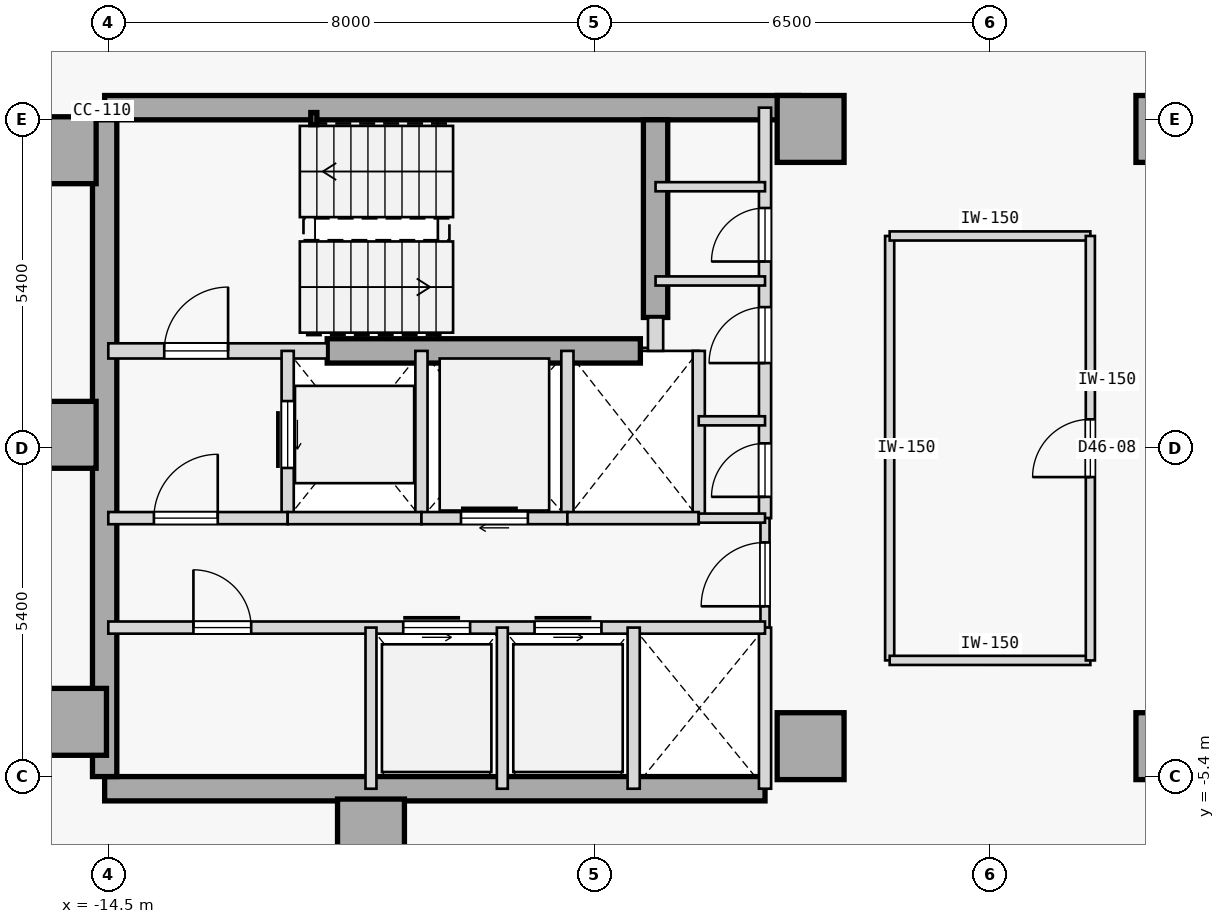
"""IFC4 building model, lengths in metres.
Left out: names, types, materials, properties, quantities, classifications, styles, units other than length and angle.
Written with IfcOpenShell. Run it as: python <this file> out.ifc"""

import sys

from ifc_helpers import new_model, si_unit, direction, frame, frame_2d, origin, origin_2d, place, context, subcontext, project, spatial, rectangle, hollow_rectangle, extrude, element, fill, save


model = new_model("IFC4")
c1 = context("Model", 3, precision=1e-05, world=origin(), true_north=direction((0.0, 1.0)))
c2 = subcontext(c1, "Body", "Model", "MODEL_VIEW")
j1 = project(units=[si_unit("LENGTHUNIT", "METRE"), si_unit("PLANEANGLEUNIT", "RADIAN")], contexts=[c1])
p1 = place(None, origin())
s1 = spatial("IfcSite", under=j1, at=p1, CompositionType="ELEMENT")
p2 = place(p1, origin())
s2 = spatial("IfcBuilding", under=s1, at=p2, CompositionType="ELEMENT")
p3 = place(p2, frame((0.0, 0.0, 178.6)))
s3 = spatial("IfcBuildingStorey", under=s2, at=p3, CompositionType="ELEMENT", Elevation=178.6)
for number, where, z_axis, x_axis in (
    (1, (-15.25, 4.9, 0.0), (0.0, 0.0, 1.0), (1.0, 0.0, 0.0)),
    (2, (-15.25, 0.22, 0.0), (0.0, 0.0, 1.0), (1.0, 0.0, 0.0)),
    (3, (-15.08, -4.5, 0.0), (0.0, 0.0, 1.0), (1.0, 0.0, 0.0)),
    (4, (-10.18, -6.32, 0.0), (0.0, 0.0, 1.0), (1.0, 0.0, 0.0)),
    (5, (-2.95, -4.9, 0.0), (0.0, 0.0, 1.0), (1.0, 0.0, 0.0)),
    (6, (-2.95, 5.25, 0.0), (0.0, 0.0, 1.0), (1.0, 0.0, 0.0)),
    (7, (2.95, -4.9, 0.0), (0.0, 0.0, 1.0), (1.0, 0.0, 0.0)),
    (8, (2.95, 5.25, 0.0), (0.0, 0.0, 1.0), (1.0, 0.0, 0.0)),
):
    element("IfcColumn", number, at=place(p3, frame(where, z_axis=z_axis, x_axis=x_axis)), inside=s3, PredefinedType="COLUMN", context=c2, shape_type="SweptSolid", body=[
        extrude(rectangle(XDim=1.1, YDim=1.1, at=origin_2d()), origin(), (0.0, 0.0, 1.0), 3.4),
    ])
p4 = place(p3, frame((-14.56, 5.6, 0.0), z_axis=(0.0, 0.0, 1.0), x_axis=(1.0, 0.0, 0.0)))
e9 = element("IfcWall", 9, at=p4, inside=s3, PredefinedType="SHEAR", context=c2, shape_type="SweptSolid", body=[
    extrude(rectangle(XDim=11.41, YDim=0.4, at=frame_2d((5.705, 0.0))), origin(), (0.0, 0.0, 1.0), 3.175),
])
p5 = place(p3, frame((-14.56, -5.6, 0.0), z_axis=(0.0, 0.0, 1.0), x_axis=(1.0, 0.0, 0.0)))
e10 = element("IfcWall", 10, at=p5, inside=s3, PredefinedType="SHEAR", context=c2, shape_type="SweptSolid", body=[
    extrude(rectangle(XDim=10.86, YDim=0.4, at=frame_2d((5.43, 0.0))), origin(), (0.0, 0.0, 1.0), 3.175),
])
p6 = place(p3, frame((-14.56, -5.4, 0.0), z_axis=(0.0, 0.0, 1.0), x_axis=(0.0, 1.0, 0.0)))
e11 = element("IfcWall", 11, at=p6, inside=s3, PredefinedType="SHEAR", context=c2, shape_type="SweptSolid", body=[
    extrude(rectangle(XDim=10.8, YDim=0.4, at=frame_2d((5.4, 0.0))), origin(), (0.0, 0.0, 1.0), 3.175),
])
p7 = place(p3, frame((-5.5, 2.15, 0.0), z_axis=(0.0, 0.0, 1.0), x_axis=(0.0, 1.0, 0.0)))
e12 = element("IfcWall", 12, at=p7, inside=s3, PredefinedType="SHEAR", context=c2, shape_type="SweptSolid", body=[
    extrude(rectangle(XDim=3.25, YDim=0.4, at=frame_2d((1.625, 0.0))), origin(), (0.0, 0.0, 1.0), 3.175),
])
p8 = place(p3, frame((-10.9, 1.6, 0.0), z_axis=(0.0, 0.0, 1.0), x_axis=(1.0, 0.0, 0.0)))
e13 = element("IfcWall", 13, at=p8, inside=s3, PredefinedType="SHEAR", context=c2, shape_type="SweptSolid", body=[
    extrude(rectangle(XDim=5.15, YDim=0.4, at=frame_2d((2.575, 0.0))), origin(), (0.0, 0.0, 1.0), 3.175),
])
p9 = place(p3, frame((-11.12, 5.42, 0.0), z_axis=(0.0, 0.0, 1.0), x_axis=(1.0, 0.0, 0.0)))
e14 = element("IfcColumn", 14, at=p9, inside=s3, PredefinedType="COLUMN", context=c2, shape_type="SweptSolid", body=[
    extrude(hollow_rectangle(XDim=0.1, YDim=0.2, WallThickness=0.008, at=origin_2d()), origin(), (0.0, 0.0, 1.0), 3.4),
])
p10 = place(p3, frame((-14.5, 1.6, 0.0), z_axis=(0.0, 0.0, 1.0), x_axis=(1.0, 0.0, 0.0)))
e15 = element("IfcWall", 15, at=p10, inside=s3, PredefinedType="STANDARD", context=c2, shape_type="SweptSolid", body=[
    extrude(rectangle(XDim=3.6, YDim=0.25, at=frame_2d((1.8, 0.0))), origin(), (0.0, 0.0, 1.0), 3.175),
])
p11 = place(p10, frame((0.92, 0.0, 0.0)))
e16 = element("IfcOpeningElement", 16, at=p11, cuts=e15, PredefinedType="OPENING", context=c2, shape_type="SweptSolid", body=[
    extrude(rectangle(XDim=1.05, YDim=2.15, at=frame_2d((0.525, 1.075))), frame((0.0, 0.135, 0.0), z_axis=(0.0, -1.0, 0.0), x_axis=(1.0, 0.0, 0.0)), (0.0, 0.0, 1.0), 0.27),
])
p12 = place(p3, frame((-5.5, 1.6, 0.0), z_axis=(0.0, 0.0, 1.0), x_axis=(0.0, 1.0, 0.0)))
e17 = element("IfcWall", 17, at=p12, inside=s3, PredefinedType="STANDARD", context=c2, shape_type="SweptSolid", body=[
    extrude(rectangle(XDim=0.55, YDim=0.25, at=frame_2d((0.275, 0.0))), origin(), (0.0, 0.0, 1.0), 3.175),
])
p13 = place(p3, frame((-3.7, -1.15, 0.0), z_axis=(0.0, 0.0, 1.0), x_axis=(0.0, 1.0, 0.0)))
e18 = element("IfcWall", 18, at=p13, inside=s3, PredefinedType="STANDARD", context=c2, shape_type="SweptSolid", body=[
    extrude(rectangle(XDim=6.75, YDim=0.2, at=frame_2d((3.375, 0.0))), origin(), (0.0, 0.0, 1.0), 3.175),
])
p14 = place(p13, frame((0.35, 0.0, 0.0)))
e19 = element("IfcOpeningElement", 19, at=p14, cuts=e18, PredefinedType="OPENING", context=c2, shape_type="SweptSolid", body=[
    extrude(rectangle(XDim=0.88, YDim=2.15, at=frame_2d((0.44, 1.075))), frame((0.0, 0.11, 0.0), z_axis=(0.0, -1.0, 0.0), x_axis=(1.0, 0.0, 0.0)), (0.0, 0.0, 1.0), 0.22),
])
p15 = place(p13, frame((2.55, 0.0, 0.0)))
e20 = element("IfcOpeningElement", 20, at=p15, cuts=e18, PredefinedType="OPENING", context=c2, shape_type="SweptSolid", body=[
    extrude(rectangle(XDim=0.92, YDim=2.15, at=frame_2d((0.46, 1.075))), frame((0.0, 0.11, 0.0), z_axis=(0.0, -1.0, 0.0), x_axis=(1.0, 0.0, 0.0)), (0.0, 0.0, 1.0), 0.22),
])
p16 = place(p13, frame((4.22, 0.0, 0.0)))
e21 = element("IfcOpeningElement", 21, at=p16, cuts=e18, PredefinedType="OPENING", context=c2, shape_type="SweptSolid", body=[
    extrude(rectangle(XDim=0.88, YDim=2.15, at=frame_2d((0.44, 1.075))), frame((0.0, 0.11, 0.0), z_axis=(0.0, -1.0, 0.0), x_axis=(1.0, 0.0, 0.0)), (0.0, 0.0, 1.0), 0.22),
])
p17 = place(p3, frame((-3.7, -2.95, 0.0), z_axis=(0.0, 0.0, 1.0), x_axis=(0.0, 1.0, 0.0)))
e22 = element("IfcWall", 22, at=p17, inside=s3, PredefinedType="PARTITIONING", context=c2, shape_type="SweptSolid", body=[
    extrude(rectangle(XDim=1.8, YDim=0.15, at=frame_2d((0.9, 0.0))), origin(), (0.0, 0.0, 1.0), 3.175),
])
p18 = place(p17, frame((0.35, 0.0, 0.0)))
e23 = element("IfcOpeningElement", 23, at=p18, cuts=e22, PredefinedType="OPENING", context=c2, shape_type="SweptSolid", body=[
    extrude(rectangle(XDim=1.05, YDim=2.18, at=frame_2d((0.525, 1.09))), frame((0.0, 0.085, 0.0), z_axis=(0.0, -1.0, 0.0), x_axis=(1.0, 0.0, 0.0)), (0.0, 0.0, 1.0), 0.17),
])
p19 = place(p3, frame((-3.7, -5.6, 0.0), z_axis=(0.0, 0.0, 1.0), x_axis=(0.0, 1.0, 0.0)))
e24 = element("IfcWall", 24, at=p19, inside=s3, PredefinedType="STANDARD", context=c2, shape_type="SweptSolid", body=[
    extrude(rectangle(XDim=2.65, YDim=0.2, at=frame_2d((1.325, 0.0))), origin(), (0.0, 0.0, 1.0), 3.175),
])
p20 = place(p3, frame((-11.55, -1.15, 0.0), z_axis=(0.0, 0.0, 1.0), x_axis=(0.0, 1.0, 0.0)))
e25 = element("IfcWall", 25, at=p20, inside=s3, PredefinedType="STANDARD", context=c2, shape_type="SweptSolid", body=[
    extrude(rectangle(XDim=2.75, YDim=0.2, at=frame_2d((1.375, 0.0))), origin(), (0.0, 0.0, 1.0), 3.175),
])
p21 = place(p20, frame((0.825, 0.0, 0.0)))
e26 = element("IfcOpeningElement", 26, at=p21, cuts=e25, PredefinedType="OPENING", context=c2, shape_type="SweptSolid", body=[
    extrude(rectangle(XDim=1.1, YDim=2.15, at=frame_2d((0.55, 1.075))), frame((0.0, 0.11, 0.0), z_axis=(0.0, -1.0, 0.0), x_axis=(1.0, 0.0, 0.0)), (0.0, 0.0, 1.0), 0.22),
])
p22 = place(p3, frame((-9.35, -1.15, 0.0), z_axis=(0.0, 0.0, 1.0), x_axis=(0.0, 1.0, 0.0)))
e27 = element("IfcWall", 27, at=p22, inside=s3, PredefinedType="STANDARD", context=c2, shape_type="SweptSolid", body=[
    extrude(rectangle(XDim=2.75, YDim=0.2, at=frame_2d((1.375, 0.0))), origin(), (0.0, 0.0, 1.0), 3.175),
])
p23 = place(p3, frame((-14.5, -1.15, 0.0), z_axis=(0.0, 0.0, 1.0), x_axis=(1.0, 0.0, 0.0)))
e28 = element("IfcWall", 28, at=p23, inside=s3, PredefinedType="STANDARD", context=c2, shape_type="SweptSolid", body=[
    extrude(rectangle(XDim=2.95, YDim=0.2, at=frame_2d((1.475, 0.0))), origin(), (0.0, 0.0, 1.0), 3.175),
])
p24 = place(p23, frame((0.75, 0.0, 0.0)))
e29 = element("IfcOpeningElement", 29, at=p24, cuts=e28, PredefinedType="OPENING", context=c2, shape_type="SweptSolid", body=[
    extrude(rectangle(XDim=1.05, YDim=2.18, at=frame_2d((0.525, 1.09))), frame((0.0, 0.11, 0.0), z_axis=(0.0, -1.0, 0.0), x_axis=(1.0, 0.0, 0.0)), (0.0, 0.0, 1.0), 0.22),
])
p25 = place(p3, frame((-11.55, -1.15, 0.0), z_axis=(0.0, 0.0, 1.0), x_axis=(1.0, 0.0, 0.0)))
e30 = element("IfcWall", 30, at=p25, inside=s3, PredefinedType="STANDARD", context=c2, shape_type="SweptSolid", body=[
    extrude(rectangle(XDim=2.2, YDim=0.2, at=frame_2d((1.1, 0.0))), origin(), (0.0, 0.0, 1.0), 3.175),
])
p26 = place(p3, frame((-6.95, -1.15, 0.0), z_axis=(0.0, 0.0, 1.0), x_axis=(0.0, 1.0, 0.0)))
e31 = element("IfcWall", 31, at=p26, inside=s3, PredefinedType="STANDARD", context=c2, shape_type="SweptSolid", body=[
    extrude(rectangle(XDim=2.75, YDim=0.2, at=frame_2d((1.375, 0.0))), origin(), (0.0, 0.0, 1.0), 3.175),
])
p27 = place(p3, frame((-9.35, -1.15, 0.0), z_axis=(0.0, 0.0, 1.0), x_axis=(1.0, 0.0, 0.0)))
e32 = element("IfcWall", 32, at=p27, inside=s3, PredefinedType="STANDARD", context=c2, shape_type="SweptSolid", body=[
    extrude(rectangle(XDim=2.4, YDim=0.2, at=frame_2d((1.2, 0.0))), origin(), (0.0, 0.0, 1.0), 3.175),
])
p28 = place(p27, frame((0.65, 0.0, 0.0)))
e33 = element("IfcOpeningElement", 33, at=p28, cuts=e32, PredefinedType="OPENING", context=c2, shape_type="SweptSolid", body=[
    extrude(rectangle(XDim=1.1, YDim=2.15, at=frame_2d((0.55, 1.075))), frame((0.0, 0.11, 0.0), z_axis=(0.0, -1.0, 0.0), x_axis=(1.0, 0.0, 0.0)), (0.0, 0.0, 1.0), 0.22),
])
p29 = place(p3, frame((-4.79, -1.15, 0.0), z_axis=(0.0, 0.0, 1.0), x_axis=(0.0, 1.0, 0.0)))
e34 = element("IfcWall", 34, at=p29, inside=s3, PredefinedType="STANDARD", context=c2, shape_type="SweptSolid", body=[
    extrude(rectangle(XDim=2.75, YDim=0.2, at=frame_2d((1.375, 0.0))), origin(), (0.0, 0.0, 1.0), 3.175),
])
p30 = place(p3, frame((-6.95, -1.15, 0.0), z_axis=(0.0, 0.0, 1.0), x_axis=(1.0, 0.0, 0.0)))
e35 = element("IfcWall", 35, at=p30, inside=s3, PredefinedType="STANDARD", context=c2, shape_type="SweptSolid", body=[
    extrude(rectangle(XDim=2.16, YDim=0.2, at=frame_2d((1.08, 0.0))), origin(), (0.0, 0.0, 1.0), 3.175),
])
p31 = place(p3, frame((-4.79, -1.15, 0.0), z_axis=(0.0, 0.0, 1.0), x_axis=(1.0, 0.0, 0.0)))
e36 = element("IfcWall", 36, at=p31, inside=s3, PredefinedType="PARTITIONING", context=c2, shape_type="SweptSolid", body=[
    extrude(rectangle(XDim=1.09, YDim=0.15, at=frame_2d((0.545, 0.0))), origin(), (0.0, 0.0, 1.0), 3.175),
])
p32 = place(p3, frame((-14.5, -2.95, 0.0), z_axis=(0.0, 0.0, 1.0), x_axis=(1.0, 0.0, 0.0)))
e37 = element("IfcWall", 37, at=p32, inside=s3, PredefinedType="STANDARD", context=c2, shape_type="SweptSolid", body=[
    extrude(rectangle(XDim=10.8, YDim=0.2, at=frame_2d((5.4, 0.0))), origin(), (0.0, 0.0, 1.0), 3.175),
])
p33 = place(p32, frame((4.85, 0.0, 0.0)))
e38 = element("IfcOpeningElement", 38, at=p33, cuts=e37, PredefinedType="OPENING", context=c2, shape_type="SweptSolid", body=[
    extrude(rectangle(XDim=1.1, YDim=2.15, at=frame_2d((0.55, 1.075))), frame((0.0, 0.11, 0.0), z_axis=(0.0, -1.0, 0.0), x_axis=(1.0, 0.0, 0.0)), (0.0, 0.0, 1.0), 0.22),
])
p34 = place(p32, frame((7.01, 0.0, 0.0)))
e39 = element("IfcOpeningElement", 39, at=p34, cuts=e37, PredefinedType="OPENING", context=c2, shape_type="SweptSolid", body=[
    extrude(rectangle(XDim=1.1, YDim=2.15, at=frame_2d((0.55, 1.075))), frame((0.0, 0.11, 0.0), z_axis=(0.0, -1.0, 0.0), x_axis=(1.0, 0.0, 0.0)), (0.0, 0.0, 1.0), 0.22),
])
p35 = place(p32, frame((1.4, 0.0, 0.0)))
e40 = element("IfcOpeningElement", 40, at=p35, cuts=e37, PredefinedType="OPENING", context=c2, shape_type="SweptSolid", body=[
    extrude(rectangle(XDim=0.95, YDim=2.15, at=frame_2d((0.475, 1.075))), frame((0.0, 0.11, 0.0), z_axis=(0.0, -1.0, 0.0), x_axis=(1.0, 0.0, 0.0)), (0.0, 0.0, 1.0), 0.22),
])
p36 = place(p3, frame((-5.86, -5.6, 0.0), z_axis=(0.0, 0.0, 1.0), x_axis=(0.0, 1.0, 0.0)))
e41 = element("IfcWall", 41, at=p36, inside=s3, PredefinedType="STANDARD", context=c2, shape_type="SweptSolid", body=[
    extrude(rectangle(XDim=2.65, YDim=0.2, at=frame_2d((1.325, 0.0))), origin(), (0.0, 0.0, 1.0), 3.175),
])
for number, where, z_axis, x_axis in (
    (42, (-10.18, -5.6, 0.0), (0.0, 0.0, 1.0), (0.0, 1.0, 0.0)),
    (43, (-8.02, -5.6, 0.0), (0.0, 0.0, 1.0), (0.0, 1.0, 0.0)),
):
    element("IfcWall", number, at=place(p3, frame(where, z_axis=z_axis, x_axis=x_axis)), inside=s3, PredefinedType="STANDARD", context=c2, shape_type="SweptSolid", body=[
        extrude(rectangle(XDim=2.65, YDim=0.18, at=frame_2d((1.325, 0.0))), origin(), (0.0, 0.0, 1.0), 3.175),
    ])
p37 = place(p3, frame((-5.5, 4.3, 0.0), z_axis=(0.0, 0.0, 1.0), x_axis=(1.0, 0.0, 0.0)))
e44 = element("IfcWall", 44, at=p37, inside=s3, PredefinedType="PARTITIONING", context=c2, shape_type="SweptSolid", body=[
    extrude(rectangle(XDim=1.8, YDim=0.15, at=frame_2d((0.9, 0.0))), origin(), (0.0, 0.0, 1.0), 3.175),
])
p38 = place(p3, frame((-4.79, 0.45, 0.0), z_axis=(0.0, 0.0, 1.0), x_axis=(1.0, 0.0, 0.0)))
e45 = element("IfcWall", 45, at=p38, inside=s3, PredefinedType="PARTITIONING", context=c2, shape_type="SweptSolid", body=[
    extrude(rectangle(XDim=1.09, YDim=0.15, at=frame_2d((0.545, 0.0))), origin(), (0.0, 0.0, 1.0), 3.175),
])
p39 = place(p3, frame((-5.5, 2.75, 0.0), z_axis=(0.0, 0.0, 1.0), x_axis=(1.0, 0.0, 0.0)))
e46 = element("IfcWall", 46, at=p39, inside=s3, PredefinedType="PARTITIONING", context=c2, shape_type="SweptSolid", body=[
    extrude(rectangle(XDim=1.8, YDim=0.15, at=frame_2d((0.9, 0.0))), origin(), (0.0, 0.0, 1.0), 3.175),
])
p40 = place(p3, frame((-1.65, -3.49, 0.0), z_axis=(0.0, 0.0, 1.0), x_axis=(-3.4979712e-05, 0.999999999388, 0.0)))
e47 = element("IfcWall", 47, at=p40, inside=s3, PredefinedType="PARTITIONING", context=c2, shape_type="SweptSolid", body=[
    extrude(rectangle(XDim=6.979, YDim=0.15, at=frame_2d((3.49, 0.0))), origin(), (0.0, 0.0, 1.0), 3.175),
])
p41 = place(p3, frame((-1.65, -3.49, 0.0), z_axis=(0.0, 0.0, 1.0), x_axis=(0.999999975374, -0.000221926315, 0.0)))
e48 = element("IfcWall", 48, at=p41, inside=s3, PredefinedType="PARTITIONING", context=c2, shape_type="SweptSolid", body=[
    extrude(rectangle(XDim=3.3, YDim=0.15, at=frame_2d((1.65, 0.0))), origin(), (0.0, 0.0, 1.0), 3.175),
])
p42 = place(p3, frame((-1.65, 3.49, 0.0), z_axis=(0.0, 0.0, 1.0), x_axis=(1.0, 0.0, 0.0)))
e49 = element("IfcWall", 49, at=p42, inside=s3, PredefinedType="PARTITIONING", context=c2, shape_type="SweptSolid", body=[
    extrude(rectangle(XDim=3.3, YDim=0.15, at=frame_2d((1.65, 0.0))), origin(), (0.0, 0.0, 1.0), 3.175),
])
p43 = place(p3, frame((1.65, -3.49, 0.0), z_axis=(0.0, 0.0, 1.0), x_axis=(-6.9952083e-05, 0.999999997553, 0.0)))
e50 = element("IfcWall", 50, at=p43, inside=s3, PredefinedType="PARTITIONING", context=c2, shape_type="SweptSolid", body=[
    extrude(rectangle(XDim=6.98, YDim=0.15, at=frame_2d((3.49, 0.0))), origin(), (0.0, 0.0, 1.0), 3.175),
])
p44 = place(p43, frame((3.015, 0.0, 0.0)))
e51 = element("IfcOpeningElement", 51, at=p44, cuts=e50, PredefinedType="OPENING", context=c2, shape_type="SweptSolid", body=[
    extrude(rectangle(XDim=0.95, YDim=2.15, at=frame_2d((0.475, 1.075))), frame((0.0, 0.085, 0.0), z_axis=(0.0, -1.0, 0.0), x_axis=(1.0, 0.0, 0.0)), (0.0, 0.0, 1.0), 0.17),
])
p45 = place(p11, origin())
e52 = element("IfcDoor", 52, at=p45, inside=s3, OperationType="SINGLE_SWING_RIGHT", PredefinedType="DOOR", context=c2, shape_type="SweptSolid", body=[
    extrude(rectangle(XDim=1.05, YDim=2.15, at=frame_2d((0.525, 1.075))), frame((0.0, 0.025, 0.0), z_axis=(0.0, -1.0, 0.0), x_axis=(1.0, 0.0, 0.0)), (0.0, 0.0, 1.0), 0.05),
])
fill(e16, e52)
p46 = place(p24, origin())
e53 = element("IfcDoor", 53, at=p46, inside=s3, OperationType="SINGLE_SWING_RIGHT", PredefinedType="DOOR", context=c2, shape_type="SweptSolid", body=[
    extrude(rectangle(XDim=1.05, YDim=2.18, at=frame_2d((0.525, 1.09))), frame((0.0, 0.025, 0.0), z_axis=(0.0, -1.0, 0.0), x_axis=(1.0, 0.0, 0.0)), (0.0, 0.0, 1.0), 0.05),
])
fill(e29, e53)
p47 = place(p18, origin())
e54 = element("IfcDoor", 54, at=p47, inside=s3, OperationType="SINGLE_SWING_LEFT", PredefinedType="DOOR", context=c2, shape_type="SweptSolid", body=[
    extrude(rectangle(XDim=1.05, YDim=2.18, at=frame_2d((0.525, 1.09))), frame((0.0, 0.025, 0.0), z_axis=(0.0, -1.0, 0.0), x_axis=(1.0, 0.0, 0.0)), (0.0, 0.0, 1.0), 0.05),
])
fill(e23, e54)
p48 = place(p21, origin())
e55 = element("IfcDoor", 55, at=p48, inside=s3, OperationType="SLIDING_TO_RIGHT", PredefinedType="DOOR", context=c2, shape_type="SweptSolid", body=[
    extrude(rectangle(XDim=1.1, YDim=2.15, at=frame_2d((0.55, 1.075))), frame((0.0, 0.025, 0.0), z_axis=(0.0, -1.0, 0.0), x_axis=(1.0, 0.0, 0.0)), (0.0, 0.0, 1.0), 0.05),
])
fill(e26, e55)
p49 = place(p28, origin())
e56 = element("IfcDoor", 56, at=p49, inside=s3, OperationType="SLIDING_TO_RIGHT", PredefinedType="DOOR", context=c2, shape_type="SweptSolid", body=[
    extrude(rectangle(XDim=1.1, YDim=2.15, at=frame_2d((0.55, 1.075))), frame((0.0, 0.025, 0.0), z_axis=(0.0, -1.0, 0.0), x_axis=(1.0, 0.0, 0.0)), (0.0, 0.0, 1.0), 0.05),
])
fill(e33, e56)
p50 = place(p33, origin())
e57 = element("IfcDoor", 57, at=p50, inside=s3, OperationType="SLIDING_TO_LEFT", PredefinedType="DOOR", context=c2, shape_type="SweptSolid", body=[
    extrude(rectangle(XDim=1.1, YDim=2.15, at=frame_2d((0.55, 1.075))), frame((0.0, 0.025, 0.0), z_axis=(0.0, -1.0, 0.0), x_axis=(1.0, 0.0, 0.0)), (0.0, 0.0, 1.0), 0.05),
])
fill(e38, e57)
p51 = place(p34, origin())
e58 = element("IfcDoor", 58, at=p51, inside=s3, OperationType="SLIDING_TO_LEFT", PredefinedType="DOOR", context=c2, shape_type="SweptSolid", body=[
    extrude(rectangle(XDim=1.1, YDim=2.15, at=frame_2d((0.55, 1.075))), frame((0.0, 0.025, 0.0), z_axis=(0.0, -1.0, 0.0), x_axis=(1.0, 0.0, 0.0)), (0.0, 0.0, 1.0), 0.05),
])
fill(e39, e58)
p52 = place(p35, origin())
e59 = element("IfcDoor", 59, at=p52, inside=s3, OperationType="SINGLE_SWING_LEFT", PredefinedType="DOOR", context=c2, shape_type="SweptSolid", body=[
    extrude(rectangle(XDim=0.95, YDim=2.15, at=frame_2d((0.475, 1.075))), frame((0.0, 0.025, 0.0), z_axis=(0.0, -1.0, 0.0), x_axis=(1.0, 0.0, 0.0)), (0.0, 0.0, 1.0), 0.05),
])
fill(e40, e59)
p53 = place(p14, origin())
e60 = element("IfcDoor", 60, at=p53, inside=s3, OperationType="SINGLE_SWING_LEFT", PredefinedType="DOOR", context=c2, shape_type="SweptSolid", body=[
    extrude(rectangle(XDim=0.88, YDim=2.15, at=frame_2d((0.44, 1.075))), frame((0.0, 0.025, 0.0), z_axis=(0.0, -1.0, 0.0), x_axis=(1.0, 0.0, 0.0)), (0.0, 0.0, 1.0), 0.05),
])
fill(e19, e60)
p54 = place(p15, origin())
e61 = element("IfcDoor", 61, at=p54, inside=s3, OperationType="SINGLE_SWING_LEFT", PredefinedType="DOOR", context=c2, shape_type="SweptSolid", body=[
    extrude(rectangle(XDim=0.92, YDim=2.15, at=frame_2d((0.46, 1.075))), frame((0.0, 0.025, 0.0), z_axis=(0.0, -1.0, 0.0), x_axis=(1.0, 0.0, 0.0)), (0.0, 0.0, 1.0), 0.05),
])
fill(e20, e61)
p55 = place(p16, origin())
e62 = element("IfcDoor", 62, at=p55, inside=s3, OperationType="SINGLE_SWING_LEFT", PredefinedType="DOOR", context=c2, shape_type="SweptSolid", body=[
    extrude(rectangle(XDim=0.88, YDim=2.15, at=frame_2d((0.44, 1.075))), frame((0.0, 0.025, 0.0), z_axis=(0.0, -1.0, 0.0), x_axis=(1.0, 0.0, 0.0)), (0.0, 0.0, 1.0), 0.05),
])
fill(e21, e62)
p56 = place(p44, origin())
e63 = element("IfcDoor", 63, at=p56, inside=s3, OperationType="SINGLE_SWING_LEFT", PredefinedType="DOOR", context=c2, shape_type="SweptSolid", body=[
    extrude(rectangle(XDim=0.95, YDim=2.15, at=frame_2d((0.475, 1.075))), frame((0.0, 0.025, 0.0), z_axis=(0.0, -1.0, 0.0), x_axis=(1.0, 0.0, 0.0)), (0.0, 0.0, 1.0), 0.05),
])
fill(e51, e63)
save(model, sys.argv[1])
